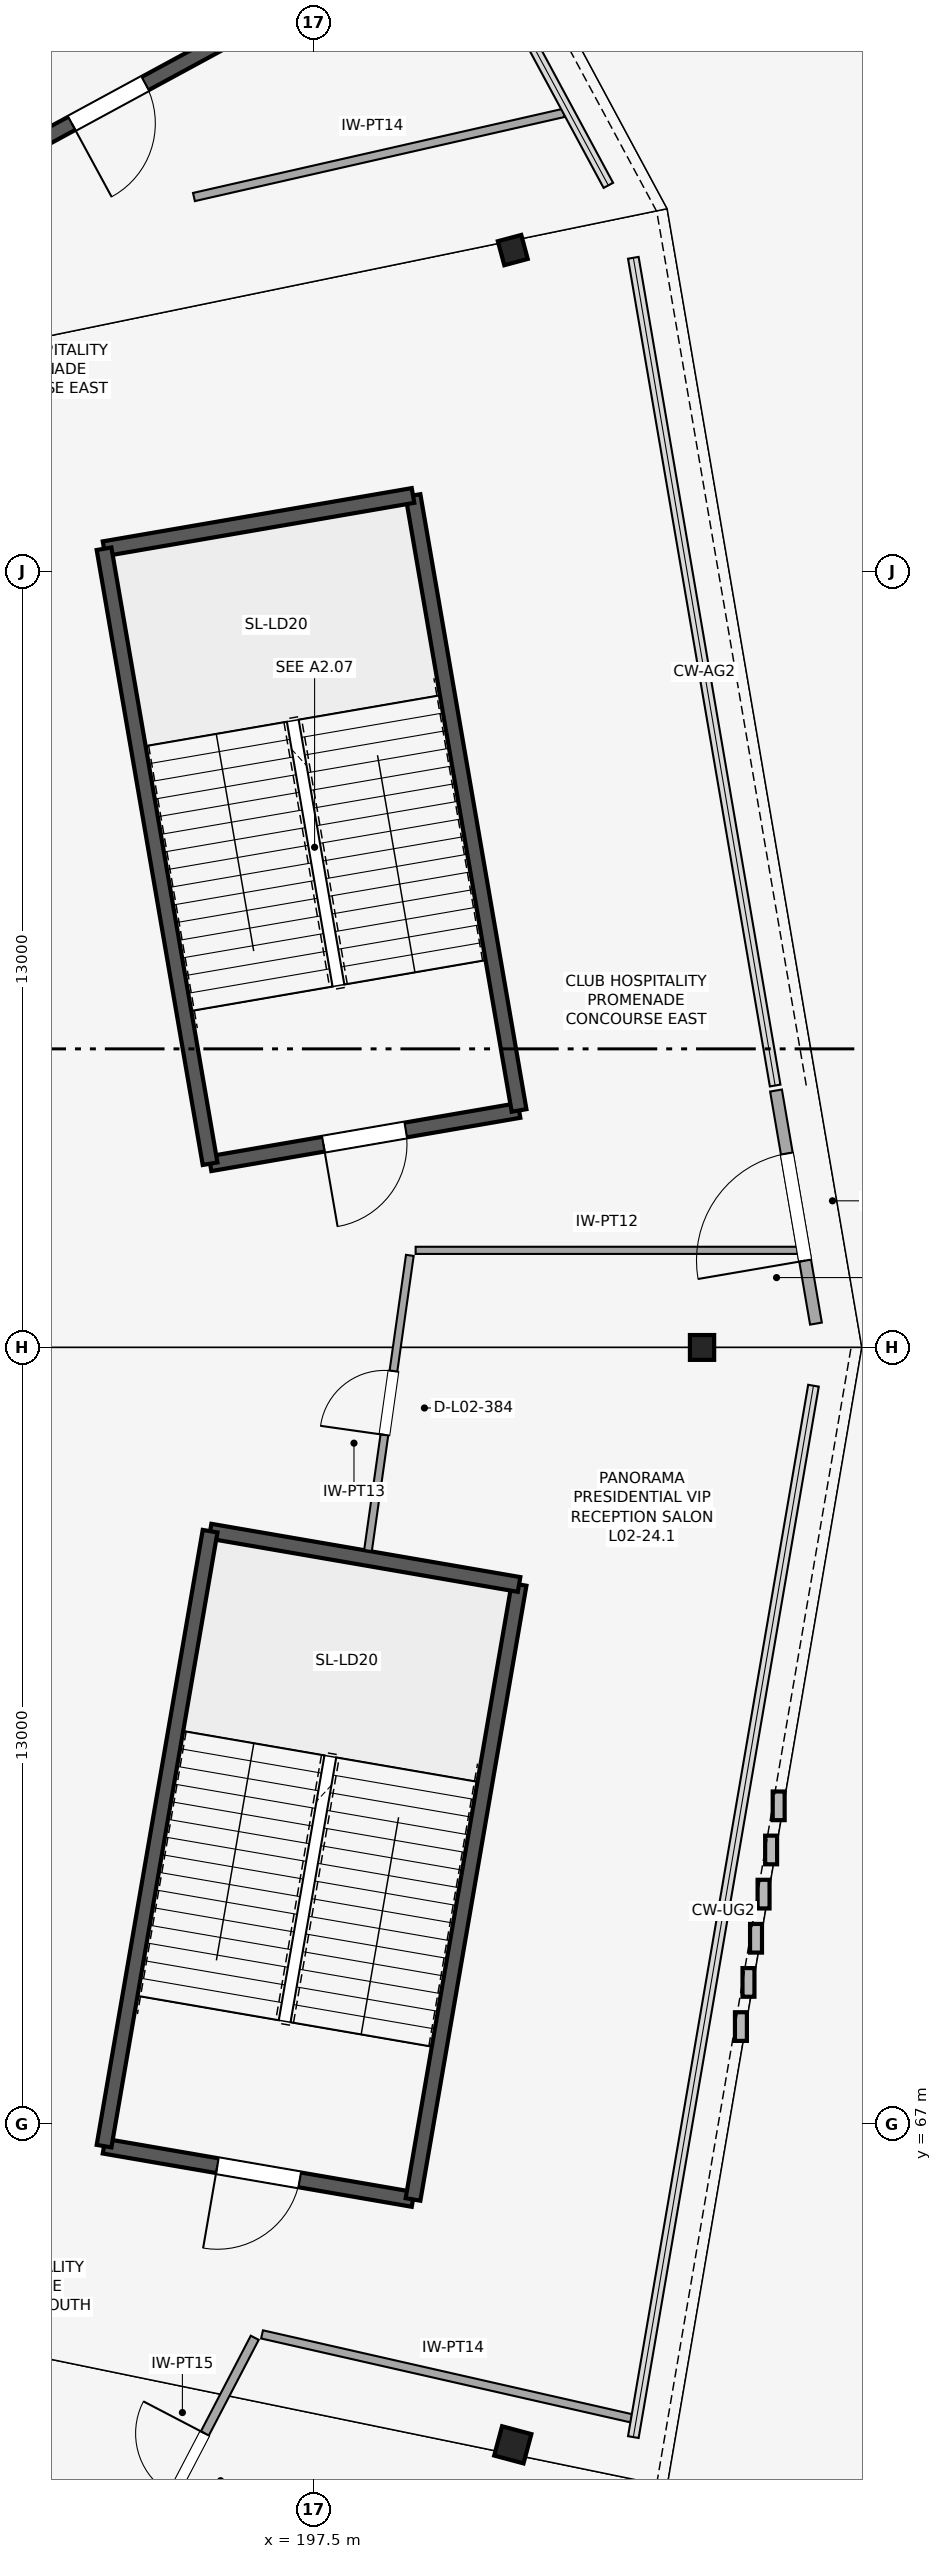
"""IFC4 building model, lengths in metres.
Left out: names, types, materials, properties, quantities, classifications, styles, units other than length and angle.
Written with IfcOpenShell. Run it as: python <this file> out.ifc"""

import sys

from ifc_helpers import new_model, si_unit, direction, frame, frame_2d, origin, origin_2d, place, context, subcontext, project, spatial, rectangle, hollow_circle, i_section, extrude, element, fill, save


model = new_model("IFC4")
c1 = context("Model", 3, precision=1e-05, world=origin(), true_north=direction((0.0, 1.0)))
c2 = subcontext(c1, "Body", "Model", "MODEL_VIEW")
j1 = project(units=[si_unit("LENGTHUNIT", "METRE"), si_unit("PLANEANGLEUNIT", "RADIAN")], contexts=[c1])
p1 = place(None, origin())
s1 = spatial("IfcSite", under=j1, at=p1, CompositionType="ELEMENT")
p2 = place(p1, origin())
s2 = spatial("IfcBuilding", under=s1, at=p2, CompositionType="ELEMENT")
p3 = place(p2, frame((0.0, 0.0, 10.6)))
s3 = spatial("IfcBuildingStorey", under=s2, at=p3, CompositionType="ELEMENT", Elevation=10.6)
p4 = place(p3, frame((204.0, 80.0, -0.28), z_axis=(0.0, 0.0, 1.0), x_axis=(1.0, 0.0, 0.0)))
e1 = element("IfcColumn", 1, at=p4, inside=s3, PredefinedType="PILASTER", context=c2, shape_type="SweptSolid", body=[
    extrude(i_section(OverallWidth=0.406, OverallDepth=0.416, WebThickness=0.024, FlangeThickness=0.039, FilletRadius=0.015, at=origin_2d()), origin(), (0.0, 0.0, 1.0), 5.28),
])
p5 = place(p3, frame((200.831, 98.376, 0.0), z_axis=(0.0, 0.0, 1.0), x_axis=(0.965925826289, 0.258819045103, 0.0)))
e2 = element("IfcColumn", 2, at=p5, inside=s3, PredefinedType="PILASTER", context=c2, shape_type="SweptSolid", body=[
    extrude(i_section(OverallWidth=0.406, OverallDepth=0.416, WebThickness=0.024, FlangeThickness=0.039, FilletRadius=0.015, at=origin_2d()), origin(), (0.0, 0.0, 1.0), 5.0),
])
p6 = place(p3, frame((200.831, 61.624, 0.0), z_axis=(0.0, 0.0, 1.0), x_axis=(0.965925826289, -0.258819045103, 0.0)))
e3 = element("IfcColumn", 3, at=p6, inside=s3, PredefinedType="COLUMN", context=c2, shape_type="SweptSolid", body=[
    extrude(hollow_circle(Radius=0.254, WallThickness=0.025, at=origin_2d()), origin(), (0.0, 0.0, 1.0), 5.0),
])
p7 = place(p3, frame((195.762, 83.077, 0.0), z_axis=(0.0, 0.0, 1.0), x_axis=(0.985457162135, 0.16992404655, 0.0)))
e4 = element("IfcWall", 4, at=p7, inside=s3, PredefinedType="SHEAR", context=c2, shape_type="SweptSolid", body=[
    extrude(rectangle(XDim=5.25, YDim=0.25, at=frame_2d((2.625, 0.0))), origin(), (0.0, 0.0, 1.0), 4.72),
])
p8 = place(p7, frame((1.925, 0.0, 0.0)))
e5 = element("IfcOpeningElement", 5, at=p8, cuts=e4, PredefinedType="OPENING", context=c2, shape_type="SweptSolid", body=[
    extrude(rectangle(XDim=1.4, YDim=2.2, at=frame_2d((0.7, 1.1))), frame((0.0, 0.135, 0.0), z_axis=(0.0, -1.0, 0.0), x_axis=(1.0, 0.0, 0.0)), (0.0, 0.0, 1.0), 0.27),
])
p9 = place(p3, frame((200.936, 83.969, 0.0), z_axis=(0.0, 0.0, 1.0), x_axis=(-0.169938992676, 0.985454584833, 0.0)))
e6 = element("IfcWall", 6, at=p9, inside=s3, PredefinedType="SHEAR", context=c2, shape_type="SweptSolid", body=[
    extrude(rectangle(XDim=10.45, YDim=0.25, at=frame_2d((5.225, 0.0))), origin(), (0.0, 0.0, 1.0), 4.72),
])
p10 = place(p3, frame((199.16, 94.267, 0.0), z_axis=(0.0, 0.0, 1.0), x_axis=(-0.985457162135, -0.16992404655, 0.0)))
e7 = element("IfcWall", 7, at=p10, inside=s3, PredefinedType="SHEAR", context=c2, shape_type="SweptSolid", body=[
    extrude(rectangle(XDim=5.25, YDim=0.25, at=frame_2d((2.625, 0.0))), origin(), (0.0, 0.0, 1.0), 4.72),
])
p11 = place(p3, frame((193.987, 93.375, 0.0), z_axis=(0.0, 0.0, 1.0), x_axis=(0.169938992676, -0.985454584833, 0.0)))
e8 = element("IfcWall", 8, at=p11, inside=s3, PredefinedType="SHEAR", context=c2, shape_type="SweptSolid", body=[
    extrude(rectangle(XDim=10.45, YDim=0.25, at=frame_2d((5.225, 0.0))), origin(), (0.0, 0.0, 1.0), 4.72),
])
p12 = place(p3, frame((191.754, 99.58, 0.0), z_axis=(0.0, 0.0, 1.0), x_axis=(0.878961487093, 0.47689275965, 0.0)))
e9 = element("IfcWall", 9, at=p12, inside=s3, PredefinedType="SHEAR", context=c2, shape_type="SweptSolid", body=[
    extrude(rectangle(XDim=5.25, YDim=0.25, at=frame_2d((2.625, 0.0))), origin(), (0.0, 0.0, 1.0), 4.72),
])
p13 = place(p12, frame((1.925, 0.0, 0.0)))
e10 = element("IfcOpeningElement", 10, at=p13, cuts=e9, PredefinedType="OPENING", context=c2, shape_type="SweptSolid", body=[
    extrude(rectangle(XDim=1.4, YDim=2.2, at=frame_2d((0.7, 1.1))), frame((0.0, 0.135, 0.0), z_axis=(0.0, -1.0, 0.0), x_axis=(1.0, 0.0, 0.0)), (0.0, 0.0, 1.0), 0.27),
])
p14 = place(p3, frame((193.987, 66.625, 0.0), z_axis=(0.0, 0.0, 1.0), x_axis=(0.985457162135, -0.16992404655, 0.0)))
e11 = element("IfcWall", 11, at=p14, inside=s3, PredefinedType="SHEAR", context=c2, shape_type="SweptSolid", body=[
    extrude(rectangle(XDim=5.25, YDim=0.25, at=frame_2d((2.625, 0.0))), origin(), (0.0, 0.0, 1.0), 4.72),
])
p15 = place(p14, frame((1.925, 0.0, 0.0)))
e12 = element("IfcOpeningElement", 12, at=p15, cuts=e11, PredefinedType="OPENING", context=c2, shape_type="SweptSolid", body=[
    extrude(rectangle(XDim=1.4, YDim=2.2, at=frame_2d((0.7, 1.1))), frame((0.0, 0.135, 0.0), z_axis=(0.0, -1.0, 0.0), x_axis=(1.0, 0.0, 0.0)), (0.0, 0.0, 1.0), 0.27),
])
p16 = place(p3, frame((199.16, 65.733, 0.0), z_axis=(0.0, 0.0, 1.0), x_axis=(0.169938992676, 0.985454584833, 0.0)))
e13 = element("IfcWall", 13, at=p16, inside=s3, PredefinedType="SHEAR", context=c2, shape_type="SweptSolid", body=[
    extrude(rectangle(XDim=10.45, YDim=0.25, at=frame_2d((5.225, 0.0))), origin(), (0.0, 0.0, 1.0), 4.72),
])
p17 = place(p3, frame((200.936, 76.031, 0.0), z_axis=(0.0, 0.0, 1.0), x_axis=(-0.985458504796, 0.169916259745, 0.0)))
e14 = element("IfcWall", 14, at=p17, inside=s3, PredefinedType="SHEAR", context=c2, shape_type="SweptSolid", body=[
    extrude(rectangle(XDim=5.25, YDim=0.25, at=frame_2d((2.625, 0.0))), origin(), (0.0, 0.0, 1.0), 4.72),
])
p18 = place(p3, frame((195.762, 76.923, 0.0), z_axis=(0.0, 0.0, 1.0), x_axis=(-0.16991630471, -0.985458497043, 0.0)))
e15 = element("IfcWall", 15, at=p18, inside=s3, PredefinedType="SHEAR", context=c2, shape_type="SweptSolid", body=[
    extrude(rectangle(XDim=10.45, YDim=0.25, at=frame_2d((5.225, 0.0))), origin(), (0.0, 0.0, 1.0), 4.72),
])
p19 = place(p3, frame((195.492, 99.265, 0.0), z_axis=(0.0, 0.0, 1.0), x_axis=(0.975092050742, 0.221800569385, 0.0)))
e16 = element("IfcWall", 16, at=p19, inside=s3, PredefinedType="PARTITIONING", context=c2, shape_type="SweptSolid", body=[
    extrude(rectangle(XDim=6.35, YDim=0.14, at=frame_2d((3.175, 0.0))), origin(), (0.0, 0.0, 1.0), 3.47),
])
p20 = place(p3, frame((194.303, 59.185, 0.0), z_axis=(0.0, 0.0, 1.0), x_axis=(0.462454112577, 0.886643216723, 0.0)))
e17 = element("IfcWall", 17, at=p20, inside=s3, PredefinedType="PARTITIONING", context=c2, shape_type="SweptSolid", body=[
    extrude(rectangle(XDim=4.772, YDim=0.15, at=frame_2d((2.386, 0.0))), origin(), (0.0, 0.0, 1.0), 3.47),
])
p21 = place(p20, frame((1.806, 0.0, 0.0)))
e18 = element("IfcOpeningElement", 18, at=p21, cuts=e17, PredefinedType="OPENING", context=c2, shape_type="SweptSolid", body=[
    extrude(rectangle(XDim=1.16, YDim=2.38, at=frame_2d((0.58, 1.19))), frame((0.0, 0.085, 0.0), z_axis=(0.0, -1.0, 0.0), x_axis=(1.0, 0.0, 0.0)), (0.0, 0.0, 1.0), 0.17),
])
p22 = place(p3, frame((196.632, 63.473, 0.0), z_axis=(0.0, 0.0, 1.0), x_axis=(0.975145332358, -0.221566199544, 0.0)))
e19 = element("IfcWall", 19, at=p22, inside=s3, PredefinedType="PARTITIONING", context=c2, shape_type="SweptSolid", body=[
    extrude(rectangle(XDim=6.343, YDim=0.14, at=frame_2d((3.171, 0.0))), origin(), (0.0, 0.0, 1.0), 3.47),
])
p23 = place(p3, frame((198.407, 76.599, 0.0), z_axis=(0.0, 0.0, 1.0), x_axis=(0.140366813121, 0.990099569626, 0.0)))
e20 = element("IfcWall", 20, at=p23, inside=s3, PredefinedType="PARTITIONING", context=c2, shape_type="SweptSolid", body=[
    extrude(rectangle(XDim=4.992, YDim=0.13, at=frame_2d((2.496, 0.0))), origin(), (0.0, 0.0, 1.0), 3.47),
])
p24 = place(p23, frame((1.956, 0.0, 0.0)))
e21 = element("IfcOpeningElement", 21, at=p24, cuts=e20, PredefinedType="OPENING", context=c2, shape_type="SweptSolid", body=[
    extrude(rectangle(XDim=1.08, YDim=2.24, at=frame_2d((0.54, 1.12))), frame((0.0, 0.075, 0.0), z_axis=(0.0, -1.0, 0.0), x_axis=(1.0, 0.0, 0.0)), (0.0, 0.0, 1.0), 0.15),
])
p25 = place(p3, frame((199.204, 81.626, 0.0), z_axis=(0.0, 0.0, 1.0), x_axis=(0.999999999274, 3.8098141e-05, 0.0)))
e22 = element("IfcWall", 22, at=p25, inside=s3, PredefinedType="PARTITIONING", context=c2, shape_type="SweptSolid", body=[
    extrude(rectangle(XDim=6.408, YDim=0.12, at=frame_2d((3.204, 0.0))), origin(), (0.0, 0.0, 1.0), 3.47),
])
p26 = place(p3, frame((205.907, 80.399, 0.0), z_axis=(0.0, 0.0, 1.0), x_axis=(-0.168866275192, 0.985638970974, 0.0)))
e23 = element("IfcWall", 23, at=p26, inside=s3, PredefinedType="PARTITIONING", context=c2, shape_type="SweptSolid", body=[
    extrude(rectangle(XDim=3.96, YDim=0.2, at=frame_2d((1.98, 0.0))), origin(), (0.0, 0.0, 1.0), 3.47),
])
p27 = place(p26, frame((1.07, 0.0, 0.0)))
e24 = element("IfcOpeningElement", 24, at=p27, cuts=e23, PredefinedType="OPENING", context=c2, shape_type="SweptSolid", body=[
    extrude(rectangle(XDim=1.82, YDim=2.38, at=frame_2d((0.91, 1.19))), frame((0.0, 0.11, 0.0), z_axis=(0.0, -1.0, 0.0), x_axis=(1.0, 0.0, 0.0)), (0.0, 0.0, 1.0), 0.22),
])
p28 = place(p8, frame((1.4, 0.0, 0.0), z_axis=(0.0, 0.0, 1.0), x_axis=(-1.0, 0.0, 0.0)))
e25 = element("IfcDoor", 25, at=p28, inside=s3, OperationType="SINGLE_SWING_RIGHT", PredefinedType="DOOR", context=c2, shape_type="SweptSolid", body=[
    extrude(rectangle(XDim=1.4, YDim=2.2, at=frame_2d((0.7, 1.1))), frame((0.0, 0.025, 0.0), z_axis=(0.0, -1.0, 0.0), x_axis=(1.0, 0.0, 0.0)), (0.0, 0.0, 1.0), 0.05),
])
fill(e5, e25)
p29 = place(p13, frame((1.4, 0.0, 0.0), z_axis=(0.0, 0.0, 1.0), x_axis=(-1.0, 0.0, 0.0)))
e26 = element("IfcDoor", 26, at=p29, inside=s3, OperationType="SINGLE_SWING_RIGHT", PredefinedType="DOOR", context=c2, shape_type="SweptSolid", body=[
    extrude(rectangle(XDim=1.4, YDim=2.2, at=frame_2d((0.7, 1.1))), frame((0.0, 0.025, 0.0), z_axis=(0.0, -1.0, 0.0), x_axis=(1.0, 0.0, 0.0)), (0.0, 0.0, 1.0), 0.05),
])
fill(e10, e26)
p30 = place(p15, frame((1.4, 0.0, 0.0), z_axis=(0.0, 0.0, 1.0), x_axis=(-1.0, 0.0, 0.0)))
e27 = element("IfcDoor", 27, at=p30, inside=s3, OperationType="SINGLE_SWING_RIGHT", PredefinedType="DOOR", context=c2, shape_type="SweptSolid", body=[
    extrude(rectangle(XDim=1.4, YDim=2.2, at=frame_2d((0.7, 1.1))), frame((0.0, 0.025, 0.0), z_axis=(0.0, -1.0, 0.0), x_axis=(1.0, 0.0, 0.0)), (0.0, 0.0, 1.0), 0.05),
])
fill(e12, e27)
p31 = place(p21, origin())
e28 = element("IfcDoor", 28, at=p31, inside=s3, OperationType="SINGLE_SWING_RIGHT", PredefinedType="DOOR", context=c2, shape_type="SweptSolid", body=[
    extrude(rectangle(XDim=1.16, YDim=2.38, at=frame_2d((0.58, 1.19))), frame((0.0, 0.025, 0.0), z_axis=(0.0, -1.0, 0.0), x_axis=(1.0, 0.0, 0.0)), (0.0, 0.0, 1.0), 0.05),
])
fill(e18, e28)
p32 = place(p24, origin())
e29 = element("IfcDoor", 29, at=p32, inside=s3, OperationType="SINGLE_SWING_LEFT", PredefinedType="DOOR", context=c2, shape_type="SweptSolid", body=[
    extrude(rectangle(XDim=1.08, YDim=2.24, at=frame_2d((0.54, 1.12))), frame((0.0, 0.025, 0.0), z_axis=(0.0, -1.0, 0.0), x_axis=(1.0, 0.0, 0.0)), (0.0, 0.0, 1.0), 0.05),
])
fill(e21, e29)
p33 = place(p27, origin())
e30 = element("IfcDoor", 30, at=p33, inside=s3, OperationType="SINGLE_SWING_LEFT", PredefinedType="DOOR", context=c2, shape_type="SweptSolid", body=[
    extrude(rectangle(XDim=1.82, YDim=2.38, at=frame_2d((0.91, 1.19))), frame((0.0, 0.025, 0.0), z_axis=(0.0, -1.0, 0.0), x_axis=(1.0, 0.0, 0.0)), (0.0, 0.0, 1.0), 0.05),
])
fill(e24, e30)
save(model, sys.argv[1])
